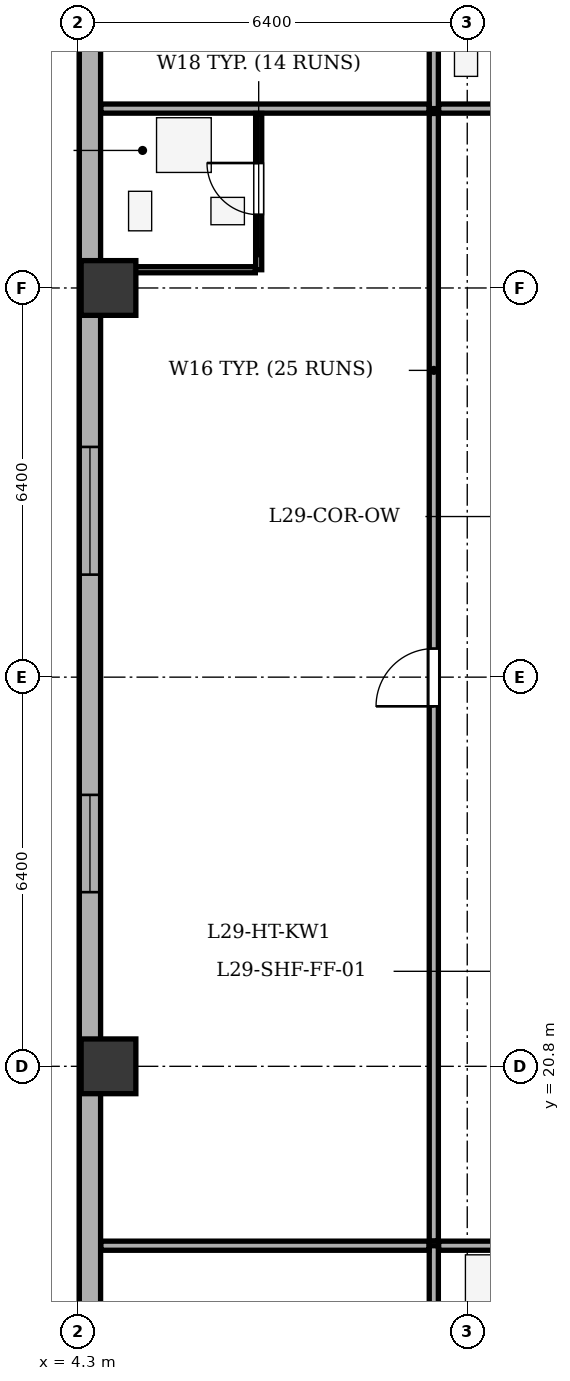
"""IFC4 building model, lengths in metres.
Left out: names, types, materials, properties, quantities, classifications, styles, units other than length and angle.
Written with IfcOpenShell. Run it as: python <this file> out.ifc"""

import sys

from ifc_helpers import new_model, si_unit, direction, frame, frame_2d, origin, origin_2d, place, context, subcontext, project, spatial, rectangle, extrude, element, fill, save


model = new_model("IFC4")
c1 = context("Model", 3, precision=1e-05, world=origin(), true_north=direction((0.0, 1.0)))
c2 = subcontext(c1, "Body", "Model", "MODEL_VIEW")
j1 = project(units=[si_unit("LENGTHUNIT", "METRE"), si_unit("PLANEANGLEUNIT", "RADIAN")], contexts=[c1])
p1 = place(None, origin())
s1 = spatial("IfcSite", under=j1, at=p1, CompositionType="ELEMENT")
p2 = place(p1, origin())
s2 = spatial("IfcBuilding", under=s1, at=p2, CompositionType="ELEMENT")
p3 = place(p2, frame((0.0, 0.0, 120.3)))
s3 = spatial("IfcBuildingStorey", under=s2, at=p3, CompositionType="ELEMENT", Elevation=120.3)
for number, where, z_axis, x_axis in (
    (1, (4.8, 20.8, 0.0), (0.0, 0.0, 1.0), (1.0, 0.0, 0.0)),
    (2, (4.8, 33.6, 0.0), (0.0, 0.0, 1.0), (1.0, 0.0, 0.0)),
):
    element("IfcColumn", number, at=place(p3, frame(where, z_axis=z_axis, x_axis=x_axis)), inside=s3, PredefinedType="COLUMN", context=c2, shape_type="SweptSolid", body=[
        extrude(rectangle(XDim=0.9, YDim=0.9, at=origin_2d()), origin(), (0.0, 0.0, 1.0), 3.5),
    ])
p4 = place(p3, frame((4.495, 6.5, 0.0), z_axis=(0.0, 0.0, 1.0), x_axis=(0.0, 1.0, 0.0)))
e3 = element("IfcWall", 3, at=p4, inside=s3, PredefinedType="STANDARD", context=c2, shape_type="SweptSolid", body=[
    extrude(rectangle(XDim=35.0, YDim=0.35, at=frame_2d((17.5, 0.0))), origin(), (0.0, 0.0, 1.0), 2.785),
])
p5 = place(p4, frame((2.595, 0.0, 0.75)))
e4 = element("IfcOpeningElement", 4, at=p5, cuts=e3, PredefinedType="OPENING", context=c2, shape_type="SweptSolid", body=[
    extrude(rectangle(XDim=1.6, YDim=1.75, at=frame_2d((0.8, 0.875))), frame((0.0, 0.185, 0.0), z_axis=(0.0, -1.0, 0.0), x_axis=(1.0, 0.0, 0.0)), (0.0, 0.0, 1.0), 0.37),
])
p6 = place(p4, frame((7.181, 0.0, 0.75)))
e5 = element("IfcOpeningElement", 5, at=p6, cuts=e3, PredefinedType="OPENING", context=c2, shape_type="SweptSolid", body=[
    extrude(rectangle(XDim=2.1, YDim=1.75, at=frame_2d((1.05, 0.875))), frame((0.0, 0.185, 0.0), z_axis=(0.0, -1.0, 0.0), x_axis=(1.0, 0.0, 0.0)), (0.0, 0.0, 1.0), 0.37),
])
p7 = place(p4, frame((17.164, 0.0, 0.75)))
e6 = element("IfcOpeningElement", 6, at=p7, cuts=e3, PredefinedType="OPENING", context=c2, shape_type="SweptSolid", body=[
    extrude(rectangle(XDim=1.6, YDim=1.75, at=frame_2d((0.8, 0.875))), frame((0.0, 0.185, 0.0), z_axis=(0.0, -1.0, 0.0), x_axis=(1.0, 0.0, 0.0)), (0.0, 0.0, 1.0), 0.37),
])
p8 = place(p4, frame((22.386, 0.0, 0.75)))
e7 = element("IfcOpeningElement", 7, at=p8, cuts=e3, PredefinedType="OPENING", context=c2, shape_type="SweptSolid", body=[
    extrude(rectangle(XDim=2.1, YDim=1.75, at=frame_2d((1.05, 0.875))), frame((0.0, 0.185, 0.0), z_axis=(0.0, -1.0, 0.0), x_axis=(1.0, 0.0, 0.0)), (0.0, 0.0, 1.0), 0.37),
])
p9 = place(p4, frame((31.588, 0.0, 0.75)))
e8 = element("IfcOpeningElement", 8, at=p9, cuts=e3, PredefinedType="OPENING", context=c2, shape_type="SweptSolid", body=[
    extrude(rectangle(XDim=1.6, YDim=1.75, at=frame_2d((0.8, 0.875))), frame((0.0, 0.185, 0.0), z_axis=(0.0, -1.0, 0.0), x_axis=(1.0, 0.0, 0.0)), (0.0, 0.0, 1.0), 0.37),
])
p10 = place(p3, frame((10.15, 1.875, 0.0), z_axis=(0.0, 0.0, 1.0), x_axis=(0.0, 1.0, 0.0)))
e9 = element("IfcWall", 9, at=p10, inside=s3, PredefinedType="PARTITIONING", context=c2, shape_type="SweptSolid", body=[
    extrude(rectangle(XDim=15.975, YDim=0.15, at=frame_2d((7.988, 0.0))), origin(), (0.0, 0.0, 1.0), 3.2),
])
p11 = place(p3, frame((10.23, 17.85, 0.0), z_axis=(0.0, 0.0, 1.0), x_axis=(1.0, 0.0, 0.0)))
e10 = element("IfcWall", 10, at=p11, inside=s3, PredefinedType="PARTITIONING", context=c2, shape_type="SweptSolid", body=[
    extrude(rectangle(XDim=1.82, YDim=0.15, at=frame_2d((0.91, 0.0))), origin(), (0.0, 0.0, 1.0), 3.2),
])
p12 = place(p3, frame((10.15, 36.55, 0.0), z_axis=(0.0, 0.0, 1.0), x_axis=(0.0, 1.0, 0.0)))
e11 = element("IfcWall", 11, at=p12, inside=s3, PredefinedType="PARTITIONING", context=c2, shape_type="SweptSolid", body=[
    extrude(rectangle(XDim=9.575, YDim=0.15, at=frame_2d((4.788, 0.0))), origin(), (0.0, 0.0, 1.0), 3.2),
])
p13 = place(p3, frame((10.23, 36.55, 0.0), z_axis=(0.0, 0.0, 1.0), x_axis=(1.0, 0.0, 0.0)))
e12 = element("IfcWall", 12, at=p13, inside=s3, PredefinedType="PARTITIONING", context=c2, shape_type="SweptSolid", body=[
    extrude(rectangle(XDim=1.82, YDim=0.15, at=frame_2d((0.91, 0.0))), origin(), (0.0, 0.0, 1.0), 3.2),
])
for number, where, z_axis, x_axis in (
    (13, (4.675, 17.85, 0.0), (0.0, 0.0, 1.0), (1.0, 0.0, 0.0)),
    (14, (4.675, 36.55, 0.0), (0.0, 0.0, 1.0), (1.0, 0.0, 0.0)),
):
    element("IfcWall", number, at=place(p3, frame(where, z_axis=z_axis, x_axis=x_axis)), inside=s3, PredefinedType="PARTITIONING", context=c2, shape_type="SweptSolid", body=[
        extrude(rectangle(XDim=5.395, YDim=0.15, at=frame_2d((2.698, 0.0))), origin(), (0.0, 0.0, 1.0), 3.2),
    ])
p14 = place(p3, frame((10.15, 17.93, 0.0), z_axis=(0.0, 0.0, 1.0), x_axis=(0.0, 1.0, 0.0)))
e15 = element("IfcWall", 15, at=p14, inside=s3, PredefinedType="PARTITIONING", context=c2, shape_type="SweptSolid", body=[
    extrude(rectangle(XDim=18.54, YDim=0.15, at=frame_2d((9.27, 0.0))), origin(), (0.0, 0.0, 1.0), 3.2),
])
p15 = place(p14, frame((8.79, 0.0, 0.0)))
e16 = element("IfcOpeningElement", 16, at=p15, cuts=e15, PredefinedType="OPENING", context=c2, shape_type="SweptSolid", body=[
    extrude(rectangle(XDim=0.95, YDim=2.1, at=frame_2d((0.475, 1.05))), frame((0.0, 0.085, 0.0), z_axis=(0.0, -1.0, 0.0), x_axis=(1.0, 0.0, 0.0)), (0.0, 0.0, 1.0), 0.17),
])
p16 = place(p3, frame((7.27, 33.9, 0.0), z_axis=(0.0, 0.0, 1.0), x_axis=(0.0, 1.0, 0.0)))
e17 = element("IfcWall", 17, at=p16, inside=s3, PredefinedType="PARTITIONING", context=c2, shape_type="SweptSolid", body=[
    extrude(rectangle(XDim=2.57, YDim=0.1, at=frame_2d((1.285, 0.0))), origin(), (0.0, 0.0, 1.0), 3.2),
])
p17 = place(p16, frame((0.905, 0.0, 0.0)))
e18 = element("IfcOpeningElement", 18, at=p17, cuts=e17, PredefinedType="OPENING", context=c2, shape_type="SweptSolid", body=[
    extrude(rectangle(XDim=0.85, YDim=2.05, at=frame_2d((0.425, 1.025))), frame((0.0, 0.06, 0.0), z_axis=(0.0, -1.0, 0.0), x_axis=(1.0, 0.0, 0.0)), (0.0, 0.0, 1.0), 0.12),
])
p18 = place(p3, frame((4.675, 33.9, 0.0), z_axis=(0.0, 0.0, 1.0), x_axis=(1.0, 0.0, 0.0)))
e19 = element("IfcWall", 19, at=p18, inside=s3, PredefinedType="PARTITIONING", context=c2, shape_type="SweptSolid", body=[
    extrude(rectangle(XDim=2.54, YDim=0.1, at=frame_2d((1.27, 0.0))), origin(), (0.0, 0.0, 1.0), 2.535),
])
p19 = place(p7, origin())
e20 = element("IfcWindow", 20, at=p19, inside=s3, PartitioningType="SINGLE_PANEL", PredefinedType="WINDOW", context=c2, shape_type="SweptSolid", body=[
    extrude(rectangle(XDim=1.6, YDim=1.75, at=frame_2d((0.8, 0.875))), frame((0.0, -0.01, 0.0), z_axis=(0.0, -1.0, 0.0), x_axis=(1.0, 0.0, 0.0)), (0.0, 0.0, 1.0), 0.06),
])
fill(e6, e20)
p20 = place(p8, origin())
e21 = element("IfcWindow", 21, at=p20, inside=s3, PartitioningType="SINGLE_PANEL", PredefinedType="WINDOW", context=c2, shape_type="SweptSolid", body=[
    extrude(rectangle(XDim=2.1, YDim=1.75, at=frame_2d((1.05, 0.875))), frame((0.0, -0.01, 0.0), z_axis=(0.0, -1.0, 0.0), x_axis=(1.0, 0.0, 0.0)), (0.0, 0.0, 1.0), 0.06),
])
fill(e7, e21)
p21 = place(p17, origin())
e22 = element("IfcDoor", 22, at=p21, inside=s3, OperationType="SINGLE_SWING_RIGHT", PredefinedType="DOOR", context=c2, shape_type="SweptSolid", body=[
    extrude(rectangle(XDim=0.85, YDim=2.05, at=frame_2d((0.425, 1.025))), frame((0.0, 0.025, 0.0), z_axis=(0.0, -1.0, 0.0), x_axis=(1.0, 0.0, 0.0)), (0.0, 0.0, 1.0), 0.05),
])
fill(e18, e22)
p22 = place(p15, origin())
e23 = element("IfcDoor", 23, at=p22, inside=s3, OperationType="SINGLE_SWING_LEFT", PredefinedType="DOOR", context=c2, shape_type="SweptSolid", body=[
    extrude(rectangle(XDim=0.95, YDim=2.1, at=frame_2d((0.475, 1.05))), frame((0.0, 0.025, 0.0), z_axis=(0.0, -1.0, 0.0), x_axis=(1.0, 0.0, 0.0)), (0.0, 0.0, 1.0), 0.05),
])
fill(e16, e23)
save(model, sys.argv[1])
